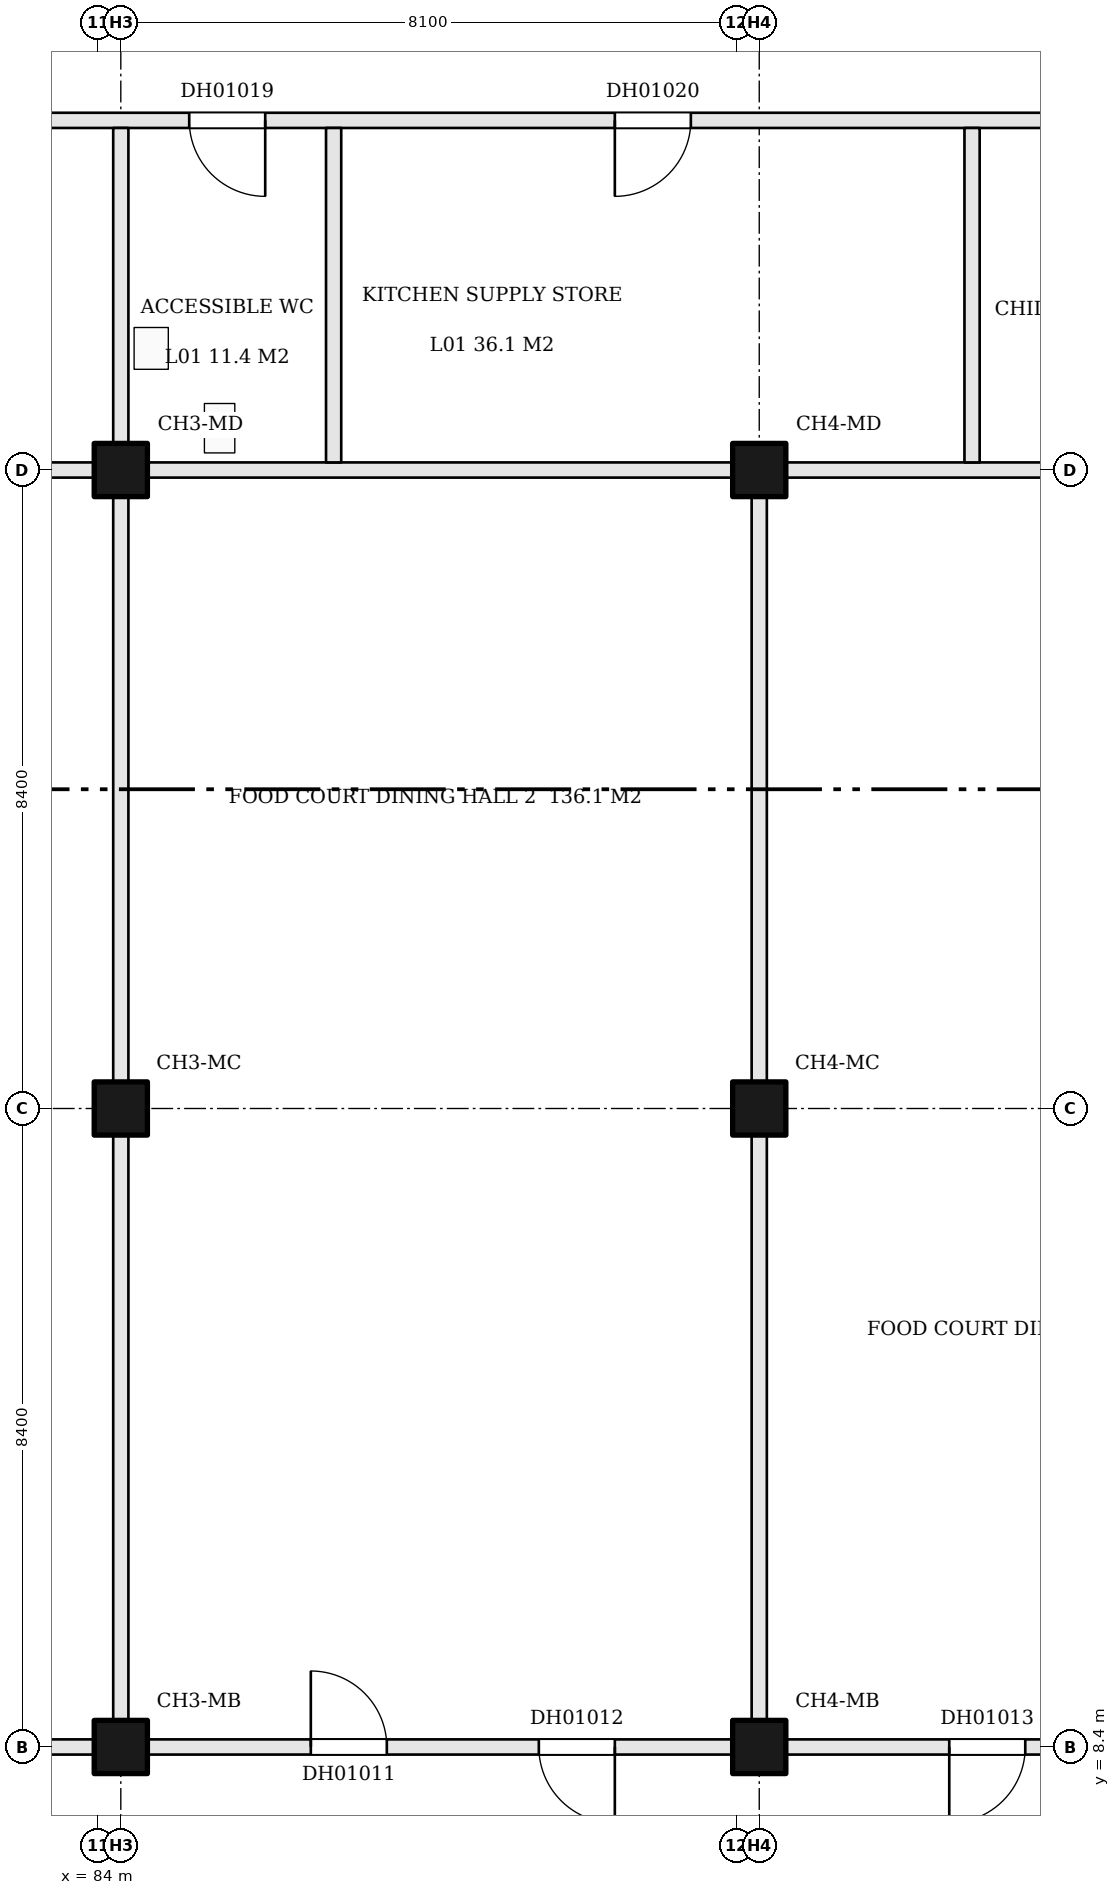
"""IFC4 building model, lengths in metres.
Left out: names, types, materials, properties, quantities, classifications, styles, units other than length and angle.
Written with IfcOpenShell. Run it as: python <this file> out.ifc"""

import sys

from ifc_helpers import new_model, si_unit, direction, frame, frame_2d, origin, origin_2d, place, context, subcontext, project, spatial, rectangle, extrude, element, fill, save


model = new_model("IFC4")
c1 = context("Model", 3, precision=1e-05, world=origin(), true_north=direction((0.0, 1.0)))
c2 = subcontext(c1, "Body", "Model", "MODEL_VIEW")
j1 = project(units=[si_unit("LENGTHUNIT", "METRE"), si_unit("PLANEANGLEUNIT", "RADIAN")], contexts=[c1])
p1 = place(None, origin())
s1 = spatial("IfcSite", under=j1, at=p1, CompositionType="ELEMENT")
p2 = place(p1, origin())
s2 = spatial("IfcBuilding", under=s1, at=p2, CompositionType="ELEMENT")
p3 = place(p2, frame((0.0, 0.0, 9.0)))
s3 = spatial("IfcBuildingStorey", under=s2, at=p3, CompositionType="ELEMENT", Elevation=9.0)
for number, where, z_axis, x_axis in (
    (1, (84.3, 8.4, 0.0), (0.0, 0.0, 1.0), (1.0, 0.0, 0.0)),
    (2, (84.3, 16.8, 0.0), (0.0, 0.0, 1.0), (1.0, 0.0, 0.0)),
    (3, (84.3, 25.2, 0.0), (0.0, 0.0, 1.0), (1.0, 0.0, 0.0)),
    (4, (92.7, 8.4, 0.0), (0.0, 0.0, 1.0), (1.0, 0.0, 0.0)),
    (5, (92.7, 16.8, 0.0), (0.0, 0.0, 1.0), (1.0, 0.0, 0.0)),
    (6, (92.7, 25.2, 0.0), (0.0, 0.0, 1.0), (1.0, 0.0, 0.0)),
):
    element("IfcColumn", number, at=place(p3, frame(where, z_axis=z_axis, x_axis=x_axis)), inside=s3, PredefinedType="COLUMN", context=c2, shape_type="SweptSolid", body=[
        extrude(rectangle(XDim=0.7, YDim=0.7, at=origin_2d()), origin(), (0.0, 0.0, 1.0), 5.1),
    ])
p4 = place(p3, frame((76.25, 8.4, 0.0), z_axis=(0.0, 0.0, 1.0), x_axis=(1.0, 0.0, 0.0)))
e7 = element("IfcWall", 7, at=p4, inside=s3, PredefinedType="PARTITIONING", context=c2, shape_type="SweptSolid", body=[
    extrude(rectangle(XDim=7.7, YDim=0.2, at=frame_2d((3.85, 0.0))), origin(), (0.0, 0.0, 1.0), 5.1),
])
p5 = place(p4, frame((2.15, 0.0, 0.0)))
e8 = element("IfcOpeningElement", 8, at=p5, cuts=e7, PredefinedType="OPENING", context=c2, shape_type="SweptSolid", body=[
    extrude(rectangle(XDim=1.0, YDim=2.1, at=frame_2d((0.5, 1.05))), frame((0.0, 0.11, 0.0), z_axis=(0.0, -1.0, 0.0), x_axis=(1.0, 0.0, 0.0)), (0.0, 0.0, 1.0), 0.22),
])
p6 = place(p4, frame((5.15, 0.0, 0.0)))
e9 = element("IfcOpeningElement", 9, at=p6, cuts=e7, PredefinedType="OPENING", context=c2, shape_type="SweptSolid", body=[
    extrude(rectangle(XDim=1.0, YDim=2.1, at=frame_2d((0.5, 1.05))), frame((0.0, 0.11, 0.0), z_axis=(0.0, -1.0, 0.0), x_axis=(1.0, 0.0, 0.0)), (0.0, 0.0, 1.0), 0.22),
])
p7 = place(p3, frame((84.65, 8.4, 0.0), z_axis=(0.0, 0.0, 1.0), x_axis=(1.0, 0.0, 0.0)))
e10 = element("IfcWall", 10, at=p7, inside=s3, PredefinedType="PARTITIONING", context=c2, shape_type="SweptSolid", body=[
    extrude(rectangle(XDim=7.7, YDim=0.2, at=frame_2d((3.85, 0.0))), origin(), (0.0, 0.0, 1.0), 5.1),
])
p8 = place(p7, frame((2.15, 0.0, 0.0)))
e11 = element("IfcOpeningElement", 11, at=p8, cuts=e10, PredefinedType="OPENING", context=c2, shape_type="SweptSolid", body=[
    extrude(rectangle(XDim=1.0, YDim=2.1, at=frame_2d((0.5, 1.05))), frame((0.0, 0.11, 0.0), z_axis=(0.0, -1.0, 0.0), x_axis=(1.0, 0.0, 0.0)), (0.0, 0.0, 1.0), 0.22),
])
p9 = place(p7, frame((5.15, 0.0, 0.0)))
e12 = element("IfcOpeningElement", 12, at=p9, cuts=e10, PredefinedType="OPENING", context=c2, shape_type="SweptSolid", body=[
    extrude(rectangle(XDim=1.0, YDim=2.1, at=frame_2d((0.5, 1.05))), frame((0.0, 0.11, 0.0), z_axis=(0.0, -1.0, 0.0), x_axis=(1.0, 0.0, 0.0)), (0.0, 0.0, 1.0), 0.22),
])
p10 = place(p3, frame((93.05, 8.4, 0.0), z_axis=(0.0, 0.0, 1.0), x_axis=(1.0, 0.0, 0.0)))
e13 = element("IfcWall", 13, at=p10, inside=s3, PredefinedType="PARTITIONING", context=c2, shape_type="SweptSolid", body=[
    extrude(rectangle(XDim=7.7, YDim=0.2, at=frame_2d((3.85, 0.0))), origin(), (0.0, 0.0, 1.0), 5.1),
])
p11 = place(p10, frame((2.15, 0.0, 0.0)))
e14 = element("IfcOpeningElement", 14, at=p11, cuts=e13, PredefinedType="OPENING", context=c2, shape_type="SweptSolid", body=[
    extrude(rectangle(XDim=1.0, YDim=2.1, at=frame_2d((0.5, 1.05))), frame((0.0, 0.11, 0.0), z_axis=(0.0, -1.0, 0.0), x_axis=(1.0, 0.0, 0.0)), (0.0, 0.0, 1.0), 0.22),
])
p12 = place(p10, frame((5.15, 0.0, 0.0)))
e15 = element("IfcOpeningElement", 15, at=p12, cuts=e13, PredefinedType="OPENING", context=c2, shape_type="SweptSolid", body=[
    extrude(rectangle(XDim=1.0, YDim=2.1, at=frame_2d((0.5, 1.05))), frame((0.0, 0.11, 0.0), z_axis=(0.0, -1.0, 0.0), x_axis=(1.0, 0.0, 0.0)), (0.0, 0.0, 1.0), 0.22),
])
p13 = place(p3, frame((76.25, 25.2, 0.0), z_axis=(0.0, 0.0, 1.0), x_axis=(1.0, 0.0, 0.0)))
e16 = element("IfcWall", 16, at=p13, inside=s3, PredefinedType="PARTITIONING", context=c2, shape_type="SweptSolid", body=[
    extrude(rectangle(XDim=7.7, YDim=0.2, at=frame_2d((3.85, 0.0))), origin(), (0.0, 0.0, 1.0), 5.1),
])
p14 = place(p3, frame((84.65, 25.2, 0.0), z_axis=(0.0, 0.0, 1.0), x_axis=(1.0, 0.0, 0.0)))
e17 = element("IfcWall", 17, at=p14, inside=s3, PredefinedType="PARTITIONING", context=c2, shape_type="SweptSolid", body=[
    extrude(rectangle(XDim=7.7, YDim=0.2, at=frame_2d((3.85, 0.0))), origin(), (0.0, 0.0, 1.0), 5.1),
])
p15 = place(p3, frame((93.05, 25.2, 0.0), z_axis=(0.0, 0.0, 1.0), x_axis=(1.0, 0.0, 0.0)))
e18 = element("IfcWall", 18, at=p15, inside=s3, PredefinedType="PARTITIONING", context=c2, shape_type="SweptSolid", body=[
    extrude(rectangle(XDim=7.7, YDim=0.2, at=frame_2d((3.85, 0.0))), origin(), (0.0, 0.0, 1.0), 5.1),
])
p16 = place(p3, frame((76.025, 29.8, 0.0), z_axis=(0.0, 0.0, 1.0), x_axis=(1.0, 0.0, 0.0)))
e19 = element("IfcWall", 19, at=p16, inside=s3, PredefinedType="PARTITIONING", context=c2, shape_type="SweptSolid", body=[
    extrude(rectangle(XDim=33.375, YDim=0.2, at=frame_2d((16.688, 0.0))), origin(), (0.0, 0.0, 1.0), 5.1),
])
p17 = place(p16, frame((1.538, 0.0, 0.0)))
e20 = element("IfcOpeningElement", 20, at=p17, cuts=e19, PredefinedType="OPENING", context=c2, shape_type="SweptSolid", body=[
    extrude(rectangle(XDim=1.0, YDim=2.1, at=frame_2d((0.5, 1.05))), frame((0.0, 0.11, 0.0), z_axis=(0.0, -1.0, 0.0), x_axis=(1.0, 0.0, 0.0)), (0.0, 0.0, 1.0), 0.22),
])
p18 = place(p16, frame((5.675, 0.0, 0.0)))
e21 = element("IfcOpeningElement", 21, at=p18, cuts=e19, PredefinedType="OPENING", context=c2, shape_type="SweptSolid", body=[
    extrude(rectangle(XDim=1.0, YDim=2.1, at=frame_2d((0.5, 1.05))), frame((0.0, 0.11, 0.0), z_axis=(0.0, -1.0, 0.0), x_axis=(1.0, 0.0, 0.0)), (0.0, 0.0, 1.0), 0.22),
])
p19 = place(p16, frame((9.175, 0.0, 0.0)))
e22 = element("IfcOpeningElement", 22, at=p19, cuts=e19, PredefinedType="OPENING", context=c2, shape_type="SweptSolid", body=[
    extrude(rectangle(XDim=1.0, YDim=2.1, at=frame_2d((0.5, 1.05))), frame((0.0, 0.11, 0.0), z_axis=(0.0, -1.0, 0.0), x_axis=(1.0, 0.0, 0.0)), (0.0, 0.0, 1.0), 0.22),
])
p20 = place(p16, frame((14.775, 0.0, 0.0)))
e23 = element("IfcOpeningElement", 23, at=p20, cuts=e19, PredefinedType="OPENING", context=c2, shape_type="SweptSolid", body=[
    extrude(rectangle(XDim=1.0, YDim=2.1, at=frame_2d((0.5, 1.05))), frame((0.0, 0.11, 0.0), z_axis=(0.0, -1.0, 0.0), x_axis=(1.0, 0.0, 0.0)), (0.0, 0.0, 1.0), 0.22),
])
p21 = place(p16, frame((22.475, 0.0, 0.0)))
e24 = element("IfcOpeningElement", 24, at=p21, cuts=e19, PredefinedType="OPENING", context=c2, shape_type="SweptSolid", body=[
    extrude(rectangle(XDim=1.0, YDim=2.1, at=frame_2d((0.5, 1.05))), frame((0.0, 0.11, 0.0), z_axis=(0.0, -1.0, 0.0), x_axis=(1.0, 0.0, 0.0)), (0.0, 0.0, 1.0), 0.22),
])
p22 = place(p16, frame((29.475, 0.0, 0.0)))
e25 = element("IfcOpeningElement", 25, at=p22, cuts=e19, PredefinedType="OPENING", context=c2, shape_type="SweptSolid", body=[
    extrude(rectangle(XDim=1.0, YDim=2.1, at=frame_2d((0.5, 1.05))), frame((0.0, 0.11, 0.0), z_axis=(0.0, -1.0, 0.0), x_axis=(1.0, 0.0, 0.0)), (0.0, 0.0, 1.0), 0.22),
])
p23 = place(p3, frame((84.3, 8.75, 0.0), z_axis=(0.0, 0.0, 1.0), x_axis=(0.0, 1.0, 0.0)))
e26 = element("IfcWall", 26, at=p23, inside=s3, PredefinedType="PARTITIONING", context=c2, shape_type="SweptSolid", body=[
    extrude(rectangle(XDim=7.7, YDim=0.2, at=frame_2d((3.85, 0.0))), origin(), (0.0, 0.0, 1.0), 5.1),
])
p24 = place(p3, frame((84.3, 17.15, 0.0), z_axis=(0.0, 0.0, 1.0), x_axis=(0.0, 1.0, 0.0)))
e27 = element("IfcWall", 27, at=p24, inside=s3, PredefinedType="PARTITIONING", context=c2, shape_type="SweptSolid", body=[
    extrude(rectangle(XDim=7.7, YDim=0.2, at=frame_2d((3.85, 0.0))), origin(), (0.0, 0.0, 1.0), 5.1),
])
p25 = place(p3, frame((84.3, 25.55, 0.0), z_axis=(0.0, 0.0, 1.0), x_axis=(0.0, 1.0, 0.0)))
e28 = element("IfcWall", 28, at=p25, inside=s3, PredefinedType="PARTITIONING", context=c2, shape_type="SweptSolid", body=[
    extrude(rectangle(XDim=4.15, YDim=0.2, at=frame_2d((2.075, 0.0))), origin(), (0.0, 0.0, 1.0), 5.1),
])
p26 = place(p3, frame((87.1, 25.3, 0.0), z_axis=(0.0, 0.0, 1.0), x_axis=(0.0, 1.0, 0.0)))
e29 = element("IfcWall", 29, at=p26, inside=s3, PredefinedType="PARTITIONING", context=c2, shape_type="SweptSolid", body=[
    extrude(rectangle(XDim=4.4, YDim=0.2, at=frame_2d((2.2, 0.0))), origin(), (0.0, 0.0, 1.0), 5.1),
])
p27 = place(p3, frame((92.7, 8.75, 0.0), z_axis=(0.0, 0.0, 1.0), x_axis=(0.0, 1.0, 0.0)))
e30 = element("IfcWall", 30, at=p27, inside=s3, PredefinedType="PARTITIONING", context=c2, shape_type="SweptSolid", body=[
    extrude(rectangle(XDim=7.7, YDim=0.2, at=frame_2d((3.85, 0.0))), origin(), (0.0, 0.0, 1.0), 5.1),
])
p28 = place(p3, frame((92.7, 17.15, 0.0), z_axis=(0.0, 0.0, 1.0), x_axis=(0.0, 1.0, 0.0)))
e31 = element("IfcWall", 31, at=p28, inside=s3, PredefinedType="PARTITIONING", context=c2, shape_type="SweptSolid", body=[
    extrude(rectangle(XDim=7.7, YDim=0.2, at=frame_2d((3.85, 0.0))), origin(), (0.0, 0.0, 1.0), 5.1),
])
p29 = place(p3, frame((95.5, 25.3, 0.0), z_axis=(0.0, 0.0, 1.0), x_axis=(0.0, 1.0, 0.0)))
e32 = element("IfcWall", 32, at=p29, inside=s3, PredefinedType="PARTITIONING", context=c2, shape_type="SweptSolid", body=[
    extrude(rectangle(XDim=4.4, YDim=0.2, at=frame_2d((2.2, 0.0))), origin(), (0.0, 0.0, 1.0), 5.1),
])
p30 = place(p8, origin())
e33 = element("IfcDoor", 33, at=p30, inside=s3, OperationType="SINGLE_SWING_LEFT", PredefinedType="DOOR", context=c2, shape_type="SweptSolid", body=[
    extrude(rectangle(XDim=1.0, YDim=2.1, at=frame_2d((0.5, 1.05))), frame((0.0, 0.025, 0.0), z_axis=(0.0, -1.0, 0.0), x_axis=(1.0, 0.0, 0.0)), (0.0, 0.0, 1.0), 0.05),
])
fill(e11, e33)
p31 = place(p9, frame((1.0, 0.0, 0.0), z_axis=(0.0, 0.0, 1.0), x_axis=(-1.0, 0.0, 0.0)))
e34 = element("IfcDoor", 34, at=p31, inside=s3, OperationType="SINGLE_SWING_LEFT", PredefinedType="DOOR", context=c2, shape_type="SweptSolid", body=[
    extrude(rectangle(XDim=1.0, YDim=2.1, at=frame_2d((0.5, 1.05))), frame((0.0, 0.025, 0.0), z_axis=(0.0, -1.0, 0.0), x_axis=(1.0, 0.0, 0.0)), (0.0, 0.0, 1.0), 0.05),
])
fill(e12, e34)
p32 = place(p11, frame((1.0, 0.0, 0.0), z_axis=(0.0, 0.0, 1.0), x_axis=(-1.0, 0.0, 0.0)))
e35 = element("IfcDoor", 35, at=p32, inside=s3, OperationType="SINGLE_SWING_RIGHT", PredefinedType="DOOR", context=c2, shape_type="SweptSolid", body=[
    extrude(rectangle(XDim=1.0, YDim=2.1, at=frame_2d((0.5, 1.05))), frame((0.0, 0.025, 0.0), z_axis=(0.0, -1.0, 0.0), x_axis=(1.0, 0.0, 0.0)), (0.0, 0.0, 1.0), 0.05),
])
fill(e14, e35)
p33 = place(p19, frame((1.0, 0.0, 0.0), z_axis=(0.0, 0.0, 1.0), x_axis=(-1.0, 0.0, 0.0)))
e36 = element("IfcDoor", 36, at=p33, inside=s3, OperationType="SINGLE_SWING_LEFT", PredefinedType="DOOR", context=c2, shape_type="SweptSolid", body=[
    extrude(rectangle(XDim=1.0, YDim=2.1, at=frame_2d((0.5, 1.05))), frame((0.0, 0.025, 0.0), z_axis=(0.0, -1.0, 0.0), x_axis=(1.0, 0.0, 0.0)), (0.0, 0.0, 1.0), 0.05),
])
fill(e22, e36)
p34 = place(p20, frame((1.0, 0.0, 0.0), z_axis=(0.0, 0.0, 1.0), x_axis=(-1.0, 0.0, 0.0)))
e37 = element("IfcDoor", 37, at=p34, inside=s3, OperationType="SINGLE_SWING_RIGHT", PredefinedType="DOOR", context=c2, shape_type="SweptSolid", body=[
    extrude(rectangle(XDim=1.0, YDim=2.1, at=frame_2d((0.5, 1.05))), frame((0.0, 0.025, 0.0), z_axis=(0.0, -1.0, 0.0), x_axis=(1.0, 0.0, 0.0)), (0.0, 0.0, 1.0), 0.05),
])
fill(e23, e37)
save(model, sys.argv[1])
